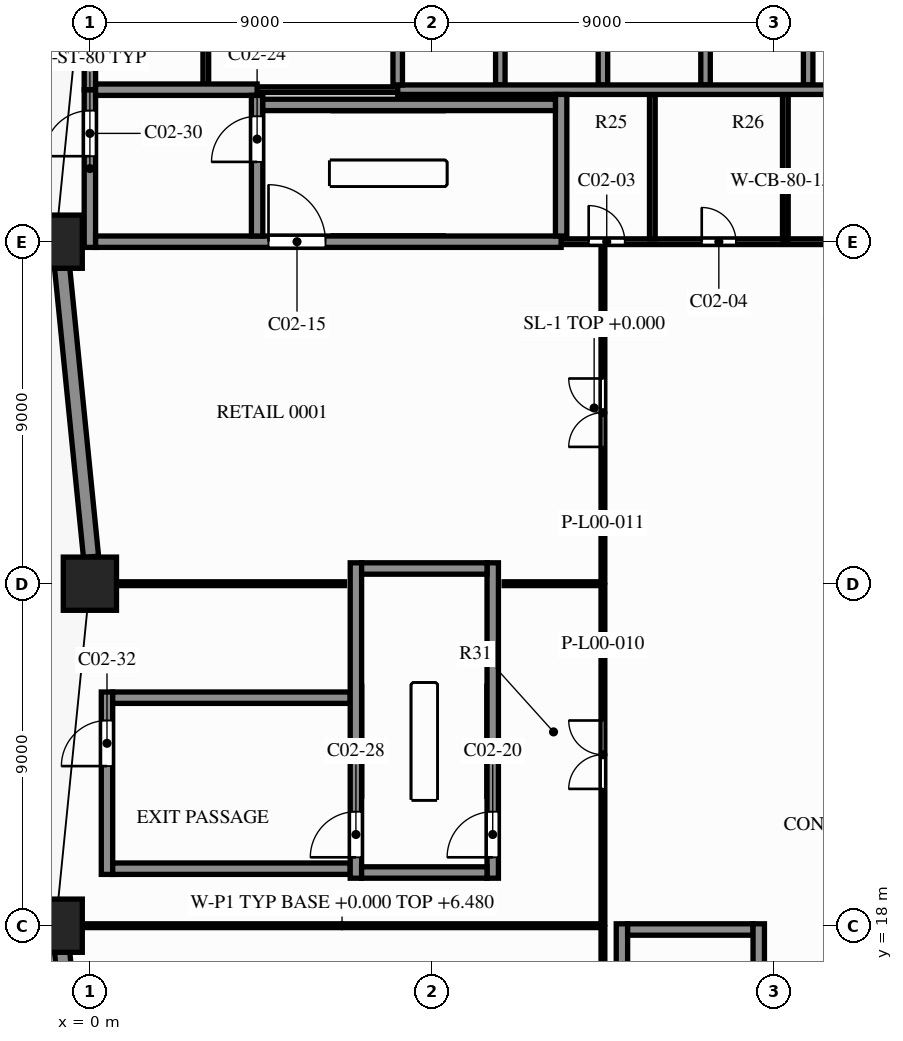
"""IFC4 building model, lengths in metres.
Left out: names, types, materials, properties, quantities, classifications, styles, units other than length and angle.
Written with IfcOpenShell. Run it as: python <this file> out.ifc"""

import sys

from ifc_helpers import new_model, si_unit, direction, frame, frame_2d, origin, origin_2d, place, context, subcontext, project, spatial, rectangle, extrude, element, fill, save


model = new_model("IFC4")
c1 = context("Model", 3, precision=1e-05, world=origin(), true_north=direction((0.0, 1.0)))
c2 = subcontext(c1, "Body", "Model", "MODEL_VIEW")
j1 = project(units=[si_unit("LENGTHUNIT", "METRE"), si_unit("PLANEANGLEUNIT", "RADIAN")], contexts=[c1])
p1 = place(None, origin())
s1 = spatial("IfcSite", under=j1, at=p1, CompositionType="ELEMENT")
p2 = place(p1, origin())
s2 = spatial("IfcBuilding", under=s1, at=p2, CompositionType="ELEMENT")
p3 = place(p2, origin())
s3 = spatial("IfcBuildingStorey", under=s2, at=p3, CompositionType="ELEMENT", Elevation=0.0)
for number, where, z_axis, x_axis in (
    (1, (-0.9, 36.0, 0.0), (0.0, 0.0, 1.0), (1.0, 0.0, 0.0)),
    (2, (0.0, 27.0, 0.0), (0.0, 0.0, 1.0), (1.0, 0.0, 0.0)),
    (3, (-0.9, 18.0, 0.0), (0.0, 0.0, 1.0), (1.0, 0.0, 0.0)),
):
    element("IfcColumn", number, at=place(p3, frame(where, z_axis=z_axis, x_axis=x_axis)), inside=s3, PredefinedType="COLUMN", context=c2, shape_type="SweptSolid", body=[
        extrude(rectangle(XDim=1.4, YDim=1.4, at=origin_2d()), origin(), (0.0, 0.0, 1.0), 7.5),
    ])
p4 = place(p3, frame((0.03, 27.707, 0.0), z_axis=(0.0, 0.0, 1.0), x_axis=(-0.099478423711, 0.995039719416, 0.0)))
e4 = element("IfcWall", 4, at=p4, inside=s3, PredefinedType="SOLIDWALL", context=c2, shape_type="SweptSolid", body=[
    extrude(rectangle(XDim=7.645, YDim=0.4, at=frame_2d((3.822, 0.0))), origin(), (0.0, 0.0, 1.0), 6.6),
])
p5 = place(p3, frame((0.03, 9.707, 0.0), z_axis=(0.0, 0.0, 1.0), x_axis=(-0.099478423711, 0.995039719416, 0.0)))
e5 = element("IfcWall", 5, at=p5, inside=s3, PredefinedType="SOLIDWALL", context=c2, shape_type="SweptSolid", body=[
    extrude(rectangle(XDim=7.645, YDim=0.4, at=frame_2d((3.822, 0.0))), origin(), (0.0, 0.0, 1.0), 6.6),
])
p6 = place(p5, frame((3.222, 0.0, 0.0)))
e6 = element("IfcOpeningElement", 6, at=p6, cuts=e5, PredefinedType="OPENING", context=c2, shape_type="SweptSolid", body=[
    extrude(rectangle(XDim=1.2, YDim=2.4, at=frame_2d((0.6, 1.2))), frame((0.0, 0.21, 0.0), z_axis=(0.0, -1.0, 0.0), x_axis=(1.0, 0.0, 0.0)), (0.0, 0.0, 1.0), 0.42),
])
for number, where, z_axis, x_axis in (
    (7, (14.15, 17.9, 0.0), (0.0, 0.0, 1.0), (1.0, 0.0, 0.0)),
    (8, (7.15, 19.4, 0.0), (0.0, 0.0, 1.0), (1.0, 0.0, 0.0)),
):
    element("IfcWall", number, at=place(p3, frame(where, z_axis=z_axis, x_axis=x_axis)), inside=s3, PredefinedType="SHEAR", context=c2, shape_type="SweptSolid", body=[
        extrude(rectangle(XDim=3.3, YDim=0.3, at=frame_2d((1.65, 0.0))), origin(), (0.0, 0.0, 1.0), 7.2),
    ])
for number, where, z_axis, x_axis in (
    (9, (0.6, 19.5, 0.0), (0.0, 0.0, 1.0), (1.0, 0.0, 0.0)),
    (10, (0.6, 24.0, 0.0), (0.0, 0.0, 1.0), (1.0, 0.0, 0.0)),
):
    element("IfcWall", number, at=place(p3, frame(where, z_axis=z_axis, x_axis=x_axis)), inside=s3, PredefinedType="SHEAR", context=c2, shape_type="SweptSolid", body=[
        extrude(rectangle(XDim=6.25, YDim=0.3, at=frame_2d((3.125, 0.0))), origin(), (0.0, 0.0, 1.0), 7.2),
    ])
p7 = place(p3, frame((7.15, 27.4, 0.0), z_axis=(0.0, 0.0, 1.0), x_axis=(1.0, 0.0, 0.0)))
e11 = element("IfcWall", 11, at=p7, inside=s3, PredefinedType="SHEAR", context=c2, shape_type="SweptSolid", body=[
    extrude(rectangle(XDim=3.3, YDim=0.3, at=frame_2d((1.65, 0.0))), origin(), (0.0, 0.0, 1.0), 7.2),
])
p8 = place(p3, frame((12.4, 36.0, 0.0), z_axis=(0.0, 0.0, 1.0), x_axis=(1.0, 0.0, 0.0)))
e12 = element("IfcWall", 12, at=p8, inside=s3, PredefinedType="SHEAR", context=c2, shape_type="SweptSolid", body=[
    extrude(rectangle(XDim=11.825, YDim=0.15, at=frame_2d((5.913, 0.0))), origin(), (0.0, 0.0, 1.0), 7.2),
])
p9 = place(p8, frame((0.725, 0.0, 0.0)))
e13 = element("IfcOpeningElement", 13, at=p9, cuts=e12, PredefinedType="OPENING", context=c2, shape_type="SweptSolid", body=[
    extrude(rectangle(XDim=0.95, YDim=2.1, at=frame_2d((0.475, 1.05))), frame((0.0, 0.085, 0.0), z_axis=(0.0, -1.0, 0.0), x_axis=(1.0, 0.0, 0.0)), (0.0, 0.0, 1.0), 0.17),
])
p10 = place(p8, frame((3.7, 0.0, 0.0)))
e14 = element("IfcOpeningElement", 14, at=p10, cuts=e12, PredefinedType="OPENING", context=c2, shape_type="SweptSolid", body=[
    extrude(rectangle(XDim=0.9, YDim=2.1, at=frame_2d((0.45, 1.05))), frame((0.0, 0.085, 0.0), z_axis=(0.0, -1.0, 0.0), x_axis=(1.0, 0.0, 0.0)), (0.0, 0.0, 1.0), 0.17),
])
p11 = place(p8, frame((7.2, 0.0, 0.0)))
e15 = element("IfcOpeningElement", 15, at=p11, cuts=e12, PredefinedType="OPENING", context=c2, shape_type="SweptSolid", body=[
    extrude(rectangle(XDim=0.9, YDim=2.1, at=frame_2d((0.45, 1.05))), frame((0.0, 0.085, 0.0), z_axis=(0.0, -1.0, 0.0), x_axis=(1.0, 0.0, 0.0)), (0.0, 0.0, 1.0), 0.17),
])
p12 = place(p8, frame((10.15, 0.0, 0.0)))
e16 = element("IfcOpeningElement", 16, at=p12, cuts=e12, PredefinedType="OPENING", context=c2, shape_type="SweptSolid", body=[
    extrude(rectangle(XDim=1.0, YDim=2.1, at=frame_2d((0.5, 1.05))), frame((0.0, 0.085, 0.0), z_axis=(0.0, -1.0, 0.0), x_axis=(1.0, 0.0, 0.0)), (0.0, 0.0, 1.0), 0.17),
])
p13 = place(p3, frame((0.15, 36.0, 0.0), z_axis=(0.0, 0.0, 1.0), x_axis=(1.0, 0.0, 0.0)))
e17 = element("IfcWall", 17, at=p13, inside=s3, PredefinedType="SHEAR", context=c2, shape_type="SweptSolid", body=[
    extrude(rectangle(XDim=12.25, YDim=0.3, at=frame_2d((6.125, 0.0))), origin(), (0.0, 0.0, 1.0), 7.2),
])
p14 = place(p13, frame((4.55, 0.0, 0.0)))
e18 = element("IfcOpeningElement", 18, at=p14, cuts=e17, PredefinedType="OPENING", context=c2, shape_type="SweptSolid", body=[
    extrude(rectangle(XDim=1.5, YDim=2.2, at=frame_2d((0.75, 1.1))), frame((0.0, 0.16, 0.0), z_axis=(0.0, -1.0, 0.0), x_axis=(1.0, 0.0, 0.0)), (0.0, 0.0, 1.0), 0.32),
])
p15 = place(p3, frame((4.55, 39.6, 0.0), z_axis=(0.0, 0.0, 1.0), x_axis=(1.0, 0.0, 0.0)))
e19 = element("IfcWall", 19, at=p15, inside=s3, PredefinedType="SHEAR", context=c2, shape_type="SweptSolid", body=[
    extrude(rectangle(XDim=7.7, YDim=0.3, at=frame_2d((3.85, 0.0))), origin(), (0.0, 0.0, 1.0), 7.2),
])
p16 = place(p3, frame((4.4, 40.0, 0.0), z_axis=(0.0, 0.0, 1.0), x_axis=(1.0, 0.0, 0.0)))
e20 = element("IfcWall", 20, at=p16, inside=s3, PredefinedType="PARTITIONING", context=c2, shape_type="SweptSolid", body=[
    extrude(rectangle(XDim=3.7, YDim=0.15, at=frame_2d((1.85, 0.0))), origin(), (0.0, 0.0, 1.0), 7.2),
])
p17 = place(p3, frame((8.1, 40.0, 0.0), z_axis=(0.0, 0.0, 1.0), x_axis=(1.0, 0.0, 0.0)))
e21 = element("IfcWall", 21, at=p17, inside=s3, PredefinedType="SHEAR", context=c2, shape_type="SweptSolid", body=[
    extrude(rectangle(XDim=16.075, YDim=0.25, at=frame_2d((8.038, 0.0))), origin(), (0.0, 0.0, 1.0), 7.2),
])
p18 = place(p3, frame((0.15, 40.0, 0.0), z_axis=(0.0, 0.0, 1.0), x_axis=(1.0, 0.0, 0.0)))
e22 = element("IfcWall", 22, at=p18, inside=s3, PredefinedType="SHEAR", context=c2, shape_type="SweptSolid", body=[
    extrude(rectangle(XDim=4.25, YDim=0.3, at=frame_2d((2.125, 0.0))), origin(), (0.0, 0.0, 1.0), 7.2),
])
p19 = place(p3, frame((0.0, 40.0, 0.0), z_axis=(0.0, 0.0, 1.0), x_axis=(0.0, 1.0, 0.0)))
e23 = element("IfcWall", 23, at=p19, inside=s3, PredefinedType="SHEAR", context=c2, shape_type="SweptSolid", body=[
    extrude(rectangle(XDim=3.275, YDim=0.3, at=frame_2d((1.637, 0.0))), origin(), (0.0, 0.0, 1.0), 7.2),
])
p20 = place(p3, frame((0.0, 35.85, 0.0), z_axis=(0.0, 0.0, 1.0), x_axis=(0.0, 1.0, 0.0)))
e24 = element("IfcWall", 24, at=p20, inside=s3, PredefinedType="SHEAR", context=c2, shape_type="SweptSolid", body=[
    extrude(rectangle(XDim=4.15, YDim=0.3, at=frame_2d((2.075, 0.0))), origin(), (0.0, 0.0, 1.0), 7.2),
])
p21 = place(p20, frame((2.4, 0.0, 0.0)))
e25 = element("IfcOpeningElement", 25, at=p21, cuts=e24, PredefinedType="OPENING", context=c2, shape_type="SweptSolid", body=[
    extrude(rectangle(XDim=1.2, YDim=2.2, at=frame_2d((0.6, 1.1))), frame((0.0, 0.16, 0.0), z_axis=(0.0, -1.0, 0.0), x_axis=(1.0, 0.0, 0.0)), (0.0, 0.0, 1.0), 0.32),
])
p22 = place(p3, frame((0.45, 19.35, 0.0), z_axis=(0.0, 0.0, 1.0), x_axis=(0.0, 1.0, 0.0)))
e26 = element("IfcWall", 26, at=p22, inside=s3, PredefinedType="SHEAR", context=c2, shape_type="SweptSolid", body=[
    extrude(rectangle(XDim=4.8, YDim=0.3, at=frame_2d((2.4, 0.0))), origin(), (0.0, 0.0, 1.0), 7.2),
])
p23 = place(p22, frame((2.85, 0.0, 0.0)))
e27 = element("IfcOpeningElement", 27, at=p23, cuts=e26, PredefinedType="OPENING", context=c2, shape_type="SweptSolid", body=[
    extrude(rectangle(XDim=1.2, YDim=2.2, at=frame_2d((0.6, 1.1))), frame((0.0, 0.16, 0.0), z_axis=(0.0, -1.0, 0.0), x_axis=(1.0, 0.0, 0.0)), (0.0, 0.0, 1.0), 0.32),
])
p24 = place(p3, frame((3.05, 40.15, 0.0), z_axis=(0.0, 0.0, 1.0), x_axis=(0.0, 1.0, 0.0)))
e28 = element("IfcWall", 28, at=p24, inside=s3, PredefinedType="PARTITIONING", context=c2, shape_type="SweptSolid", body=[
    extrude(rectangle(XDim=2.975, YDim=0.15, at=frame_2d((1.488, 0.0))), origin(), (0.0, 0.0, 1.0), 7.2),
])
p25 = place(p3, frame((4.4, 36.15, 0.0), z_axis=(0.0, 0.0, 1.0), x_axis=(0.0, 1.0, 0.0)))
e29 = element("IfcWall", 29, at=p25, inside=s3, PredefinedType="SHEAR", context=c2, shape_type="SweptSolid", body=[
    extrude(rectangle(XDim=3.7, YDim=0.3, at=frame_2d((1.85, 0.0))), origin(), (0.0, 0.0, 1.0), 7.2),
])
p26 = place(p25, frame((1.95, 0.0, 0.0)))
e30 = element("IfcOpeningElement", 30, at=p26, cuts=e29, PredefinedType="OPENING", context=c2, shape_type="SweptSolid", body=[
    extrude(rectangle(XDim=1.2, YDim=2.2, at=frame_2d((0.6, 1.1))), frame((0.0, 0.16, 0.0), z_axis=(0.0, -1.0, 0.0), x_axis=(1.0, 0.0, 0.0)), (0.0, 0.0, 1.0), 0.32),
])
p27 = place(p3, frame((7.0, 19.25, 0.0), z_axis=(0.0, 0.0, 1.0), x_axis=(0.0, 1.0, 0.0)))
e31 = element("IfcWall", 31, at=p27, inside=s3, PredefinedType="SHEAR", context=c2, shape_type="SweptSolid", body=[
    extrude(rectangle(XDim=8.3, YDim=0.3, at=frame_2d((4.15, 0.0))), origin(), (0.0, 0.0, 1.0), 7.2),
])
p28 = place(p27, frame((0.55, 0.0, 0.0)))
e32 = element("IfcOpeningElement", 32, at=p28, cuts=e31, PredefinedType="OPENING", context=c2, shape_type="SweptSolid", body=[
    extrude(rectangle(XDim=1.2, YDim=2.2, at=frame_2d((0.6, 1.1))), frame((0.0, 0.16, 0.0), z_axis=(0.0, -1.0, 0.0), x_axis=(1.0, 0.0, 0.0)), (0.0, 0.0, 1.0), 0.32),
])
p29 = place(p3, frame((8.1, 40.125, 0.0), z_axis=(0.0, 0.0, 1.0), x_axis=(0.0, 1.0, 0.0)))
e33 = element("IfcWall", 33, at=p29, inside=s3, PredefinedType="SHEAR", context=c2, shape_type="SweptSolid", body=[
    extrude(rectangle(XDim=2.95, YDim=0.25, at=frame_2d((1.475, 0.0))), origin(), (0.0, 0.0, 1.0), 7.2),
])
p30 = place(p3, frame((10.6, 19.25, 0.0), z_axis=(0.0, 0.0, 1.0), x_axis=(0.0, 1.0, 0.0)))
e34 = element("IfcWall", 34, at=p30, inside=s3, PredefinedType="SHEAR", context=c2, shape_type="SweptSolid", body=[
    extrude(rectangle(XDim=8.3, YDim=0.3, at=frame_2d((4.15, 0.0))), origin(), (0.0, 0.0, 1.0), 7.2),
])
p31 = place(p30, frame((0.55, 0.0, 0.0)))
e35 = element("IfcOpeningElement", 35, at=p31, cuts=e34, PredefinedType="OPENING", context=c2, shape_type="SweptSolid", body=[
    extrude(rectangle(XDim=1.2, YDim=2.2, at=frame_2d((0.6, 1.1))), frame((0.0, 0.16, 0.0), z_axis=(0.0, -1.0, 0.0), x_axis=(1.0, 0.0, 0.0)), (0.0, 0.0, 1.0), 0.32),
])
p32 = place(p3, frame((10.8, 40.125, 0.0), z_axis=(0.0, 0.0, 1.0), x_axis=(0.0, 1.0, 0.0)))
e36 = element("IfcWall", 36, at=p32, inside=s3, PredefinedType="SHEAR", context=c2, shape_type="SweptSolid", body=[
    extrude(rectangle(XDim=2.95, YDim=0.25, at=frame_2d((1.475, 0.0))), origin(), (0.0, 0.0, 1.0), 7.2),
])
p33 = place(p3, frame((12.4, 36.15, 0.0), z_axis=(0.0, 0.0, 1.0), x_axis=(0.0, 1.0, 0.0)))
e37 = element("IfcWall", 37, at=p33, inside=s3, PredefinedType="SHEAR", context=c2, shape_type="SweptSolid", body=[
    extrude(rectangle(XDim=3.725, YDim=0.3, at=frame_2d((1.863, 0.0))), origin(), (0.0, 0.0, 1.0), 7.2),
])
p34 = place(p3, frame((13.5, 40.125, 0.0), z_axis=(0.0, 0.0, 1.0), x_axis=(0.0, 1.0, 0.0)))
e38 = element("IfcWall", 38, at=p34, inside=s3, PredefinedType="SHEAR", context=c2, shape_type="SweptSolid", body=[
    extrude(rectangle(XDim=2.95, YDim=0.25, at=frame_2d((1.475, 0.0))), origin(), (0.0, 0.0, 1.0), 7.2),
])
p35 = place(p3, frame((14.0, 9.75, 0.0), z_axis=(0.0, 0.0, 1.0), x_axis=(0.0, 1.0, 0.0)))
e39 = element("IfcWall", 39, at=p35, inside=s3, PredefinedType="SHEAR", context=c2, shape_type="SweptSolid", body=[
    extrude(rectangle(XDim=8.3, YDim=0.3, at=frame_2d((4.15, 0.0))), origin(), (0.0, 0.0, 1.0), 7.2),
])
p36 = place(p3, frame((14.8, 36.075, 0.0), z_axis=(0.0, 0.0, 1.0), x_axis=(0.0, 1.0, 0.0)))
e40 = element("IfcWall", 40, at=p36, inside=s3, PredefinedType="PARTITIONING", context=c2, shape_type="SweptSolid", body=[
    extrude(rectangle(XDim=3.8, YDim=0.15, at=frame_2d((1.9, 0.0))), origin(), (0.0, 0.0, 1.0), 7.2),
])
p37 = place(p3, frame((16.2, 40.125, 0.0), z_axis=(0.0, 0.0, 1.0), x_axis=(0.0, 1.0, 0.0)))
e41 = element("IfcWall", 41, at=p37, inside=s3, PredefinedType="SHEAR", context=c2, shape_type="SweptSolid", body=[
    extrude(rectangle(XDim=2.95, YDim=0.25, at=frame_2d((1.475, 0.0))), origin(), (0.0, 0.0, 1.0), 7.2),
])
p38 = place(p3, frame((17.6, 9.75, 0.0), z_axis=(0.0, 0.0, 1.0), x_axis=(0.0, 1.0, 0.0)))
e42 = element("IfcWall", 42, at=p38, inside=s3, PredefinedType="SHEAR", context=c2, shape_type="SweptSolid", body=[
    extrude(rectangle(XDim=8.3, YDim=0.3, at=frame_2d((4.15, 0.0))), origin(), (0.0, 0.0, 1.0), 7.2),
])
p39 = place(p38, frame((0.65, 0.0, 0.0)))
e43 = element("IfcOpeningElement", 43, at=p39, cuts=e42, PredefinedType="OPENING", context=c2, shape_type="SweptSolid", body=[
    extrude(rectangle(XDim=1.2, YDim=2.2, at=frame_2d((0.6, 1.1))), frame((0.0, 0.16, 0.0), z_axis=(0.0, -1.0, 0.0), x_axis=(1.0, 0.0, 0.0)), (0.0, 0.0, 1.0), 0.32),
])
p40 = place(p3, frame((18.3, 36.075, 0.0), z_axis=(0.0, 0.0, 1.0), x_axis=(0.0, 1.0, 0.0)))
e44 = element("IfcWall", 44, at=p40, inside=s3, PredefinedType="PARTITIONING", context=c2, shape_type="SweptSolid", body=[
    extrude(rectangle(XDim=3.8, YDim=0.15, at=frame_2d((1.9, 0.0))), origin(), (0.0, 0.0, 1.0), 7.2),
])
p41 = place(p3, frame((18.9, 40.125, 0.0), z_axis=(0.0, 0.0, 1.0), x_axis=(0.0, 1.0, 0.0)))
e45 = element("IfcWall", 45, at=p41, inside=s3, PredefinedType="SHEAR", context=c2, shape_type="SweptSolid", body=[
    extrude(rectangle(XDim=2.95, YDim=0.25, at=frame_2d((1.475, 0.0))), origin(), (0.0, 0.0, 1.0), 7.2),
])
p42 = place(p3, frame((13.5, 9.05, 0.0), z_axis=(0.0, 0.0, 1.0), x_axis=(0.0, 1.0, 0.0)))
e46 = element("IfcWall", 46, at=p42, inside=s3, PredefinedType="PARTITIONING", context=c2, shape_type="SweptSolid", body=[
    extrude(rectangle(XDim=8.9, YDim=0.1, at=frame_2d((4.45, 0.0))), origin(), (0.0, 0.0, 1.0), 6.48),
])
p43 = place(p3, frame((-0.18, 18.0, 0.0), z_axis=(0.0, 0.0, 1.0), x_axis=(1.0, 0.0, 0.0)))
e47 = element("IfcWall", 47, at=p43, inside=s3, PredefinedType="PARTITIONING", context=c2, shape_type="SweptSolid", body=[
    extrude(rectangle(XDim=13.63, YDim=0.1, at=frame_2d((6.815, 0.0))), origin(), (0.0, 0.0, 1.0), 6.48),
])
p44 = place(p3, frame((13.5, 18.05, 0.0), z_axis=(0.0, 0.0, 1.0), x_axis=(0.0, 1.0, 0.0)))
e48 = element("IfcWall", 48, at=p44, inside=s3, PredefinedType="PARTITIONING", context=c2, shape_type="SweptSolid", body=[
    extrude(rectangle(XDim=8.9, YDim=0.1, at=frame_2d((4.45, 0.0))), origin(), (0.0, 0.0, 1.0), 6.48),
])
p45 = place(p44, frame((3.55, 0.0, 0.0)))
e49 = element("IfcOpeningElement", 49, at=p45, cuts=e48, PredefinedType="OPENING", context=c2, shape_type="SweptSolid", body=[
    extrude(rectangle(XDim=1.8, YDim=2.1, at=frame_2d((0.9, 1.05))), frame((0.0, 0.06, 0.0), z_axis=(0.0, -1.0, 0.0), x_axis=(1.0, 0.0, 0.0)), (0.0, 0.0, 1.0), 0.12),
])
p46 = place(p3, frame((0.72, 27.0, 0.0), z_axis=(0.0, 0.0, 1.0), x_axis=(1.0, 0.0, 0.0)))
e50 = element("IfcWall", 50, at=p46, inside=s3, PredefinedType="PARTITIONING", context=c2, shape_type="SweptSolid", body=[
    extrude(rectangle(XDim=5.98, YDim=0.1, at=frame_2d((2.99, 0.0))), origin(), (0.0, 0.0, 1.0), 6.48),
])
p47 = place(p3, frame((10.9, 27.0, 0.0), z_axis=(0.0, 0.0, 1.0), x_axis=(1.0, 0.0, 0.0)))
e51 = element("IfcWall", 51, at=p47, inside=s3, PredefinedType="PARTITIONING", context=c2, shape_type="SweptSolid", body=[
    extrude(rectangle(XDim=2.55, YDim=0.1, at=frame_2d((1.275, 0.0))), origin(), (0.0, 0.0, 1.0), 6.48),
])
p48 = place(p3, frame((13.5, 27.05, 0.0), z_axis=(0.0, 0.0, 1.0), x_axis=(0.0, 1.0, 0.0)))
e52 = element("IfcWall", 52, at=p48, inside=s3, PredefinedType="PARTITIONING", context=c2, shape_type="SweptSolid", body=[
    extrude(rectangle(XDim=8.8, YDim=0.1, at=frame_2d((4.4, 0.0))), origin(), (0.0, 0.0, 1.0), 6.48),
])
p49 = place(p48, frame((3.55, 0.0, 0.0)))
e53 = element("IfcOpeningElement", 53, at=p49, cuts=e52, PredefinedType="OPENING", context=c2, shape_type="SweptSolid", body=[
    extrude(rectangle(XDim=1.8, YDim=2.1, at=frame_2d((0.9, 1.05))), frame((0.0, 0.06, 0.0), z_axis=(0.0, -1.0, 0.0), x_axis=(1.0, 0.0, 0.0)), (0.0, 0.0, 1.0), 0.12),
])
p50 = place(p9, origin())
e54 = element("IfcDoor", 54, at=p50, inside=s3, OperationType="SINGLE_SWING_RIGHT", PredefinedType="DOOR", context=c2, shape_type="SweptSolid", body=[
    extrude(rectangle(XDim=0.95, YDim=2.1, at=frame_2d((0.475, 1.05))), frame((0.0, 0.025, 0.0), z_axis=(0.0, -1.0, 0.0), x_axis=(1.0, 0.0, 0.0)), (0.0, 0.0, 1.0), 0.05),
])
fill(e13, e54)
p51 = place(p10, origin())
e55 = element("IfcDoor", 55, at=p51, inside=s3, OperationType="SINGLE_SWING_LEFT", PredefinedType="DOOR", context=c2, shape_type="SweptSolid", body=[
    extrude(rectangle(XDim=0.9, YDim=2.1, at=frame_2d((0.45, 1.05))), frame((0.0, 0.025, 0.0), z_axis=(0.0, -1.0, 0.0), x_axis=(1.0, 0.0, 0.0)), (0.0, 0.0, 1.0), 0.05),
])
fill(e14, e55)
p52 = place(p14, origin())
e56 = element("IfcDoor", 56, at=p52, inside=s3, OperationType="SINGLE_SWING_RIGHT", PredefinedType="DOOR", context=c2, shape_type="SweptSolid", body=[
    extrude(rectangle(XDim=1.5, YDim=2.2, at=frame_2d((0.75, 1.1))), frame((0.0, 0.025, 0.0), z_axis=(0.0, -1.0, 0.0), x_axis=(1.0, 0.0, 0.0)), (0.0, 0.0, 1.0), 0.05),
])
fill(e18, e56)
p53 = place(p31, origin())
e57 = element("IfcDoor", 57, at=p53, inside=s3, OperationType="SINGLE_SWING_RIGHT", PredefinedType="DOOR", context=c2, shape_type="SweptSolid", body=[
    extrude(rectangle(XDim=1.2, YDim=2.2, at=frame_2d((0.6, 1.1))), frame((0.0, 0.025, 0.0), z_axis=(0.0, -1.0, 0.0), x_axis=(1.0, 0.0, 0.0)), (0.0, 0.0, 1.0), 0.05),
])
fill(e35, e57)
p54 = place(p26, origin())
e58 = element("IfcDoor", 58, at=p54, inside=s3, OperationType="SINGLE_SWING_LEFT", PredefinedType="DOOR", context=c2, shape_type="SweptSolid", body=[
    extrude(rectangle(XDim=1.2, YDim=2.2, at=frame_2d((0.6, 1.1))), frame((0.0, 0.025, 0.0), z_axis=(0.0, -1.0, 0.0), x_axis=(1.0, 0.0, 0.0)), (0.0, 0.0, 1.0), 0.05),
])
fill(e30, e58)
p55 = place(p28, origin())
e59 = element("IfcDoor", 59, at=p55, inside=s3, OperationType="SINGLE_SWING_LEFT", PredefinedType="DOOR", context=c2, shape_type="SweptSolid", body=[
    extrude(rectangle(XDim=1.2, YDim=2.2, at=frame_2d((0.6, 1.1))), frame((0.0, 0.025, 0.0), z_axis=(0.0, -1.0, 0.0), x_axis=(1.0, 0.0, 0.0)), (0.0, 0.0, 1.0), 0.05),
])
fill(e32, e59)
p56 = place(p21, origin())
e60 = element("IfcDoor", 60, at=p56, inside=s3, OperationType="SINGLE_SWING_RIGHT", PredefinedType="DOOR", context=c2, shape_type="SweptSolid", body=[
    extrude(rectangle(XDim=1.2, YDim=2.2, at=frame_2d((0.6, 1.1))), frame((0.0, 0.025, 0.0), z_axis=(0.0, -1.0, 0.0), x_axis=(1.0, 0.0, 0.0)), (0.0, 0.0, 1.0), 0.05),
])
fill(e25, e60)
p57 = place(p23, origin())
e61 = element("IfcDoor", 61, at=p57, inside=s3, OperationType="SINGLE_SWING_RIGHT", PredefinedType="DOOR", context=c2, shape_type="SweptSolid", body=[
    extrude(rectangle(XDim=1.2, YDim=2.2, at=frame_2d((0.6, 1.1))), frame((0.0, 0.025, 0.0), z_axis=(0.0, -1.0, 0.0), x_axis=(1.0, 0.0, 0.0)), (0.0, 0.0, 1.0), 0.05),
])
fill(e27, e61)
p58 = place(p45, origin())
e62 = element("IfcDoor", 62, at=p58, inside=s3, OperationType="DOUBLE_DOOR_SINGLE_SWING", PredefinedType="DOOR", context=c2, shape_type="SweptSolid", body=[
    extrude(rectangle(XDim=1.8, YDim=2.1, at=frame_2d((0.9, 1.05))), frame((0.0, 0.025, 0.0), z_axis=(0.0, -1.0, 0.0), x_axis=(1.0, 0.0, 0.0)), (0.0, 0.0, 1.0), 0.05),
])
fill(e49, e62)
p59 = place(p49, origin())
e63 = element("IfcDoor", 63, at=p59, inside=s3, OperationType="DOUBLE_DOOR_SINGLE_SWING", PredefinedType="DOOR", context=c2, shape_type="SweptSolid", body=[
    extrude(rectangle(XDim=1.8, YDim=2.1, at=frame_2d((0.9, 1.05))), frame((0.0, 0.025, 0.0), z_axis=(0.0, -1.0, 0.0), x_axis=(1.0, 0.0, 0.0)), (0.0, 0.0, 1.0), 0.05),
])
fill(e53, e63)
save(model, sys.argv[1])
